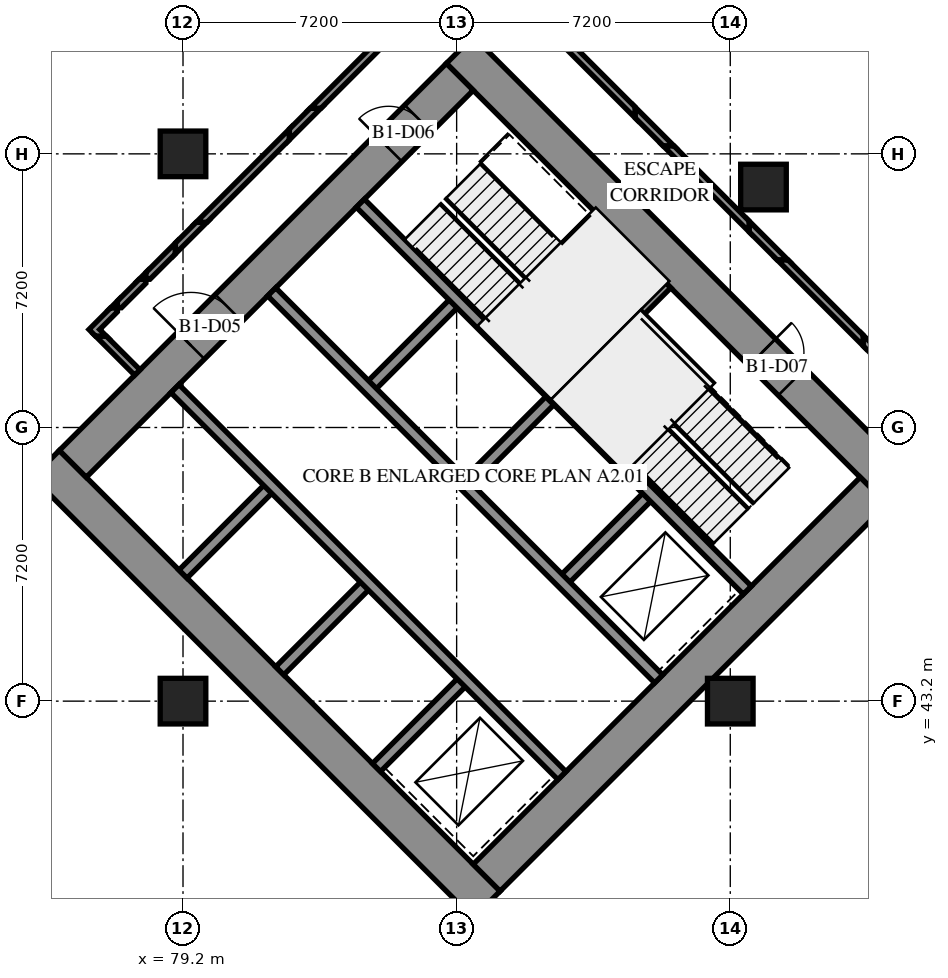
"""IFC4 building model, lengths in metres.
Left out: names, types, materials, properties, quantities, classifications, styles, units other than length and angle.
Written with IfcOpenShell. Run it as: python <this file> out.ifc"""

import sys

from ifc_helpers import new_model, si_unit, direction, frame, frame_2d, origin, origin_2d, place, context, subcontext, project, spatial, polyline, rectangle, outline, extrude, element, fill, save


model = new_model("IFC4")
c1 = context("Model", 3, precision=1e-05, world=origin(), true_north=direction((0.0, 1.0)))
c2 = subcontext(c1, "Body", "Model", "MODEL_VIEW")
j1 = project(units=[si_unit("LENGTHUNIT", "METRE"), si_unit("PLANEANGLEUNIT", "RADIAN")], contexts=[c1])
p1 = place(None, origin())
s1 = spatial("IfcSite", under=j1, at=p1, CompositionType="ELEMENT")
p2 = place(p1, origin())
s2 = spatial("IfcBuilding", under=s1, at=p2, CompositionType="ELEMENT")
p3 = place(p2, frame((0.0, 0.0, -4.5)))
s3 = spatial("IfcBuildingStorey", under=s2, at=p3, CompositionType="ELEMENT", Elevation=-4.5)
p4 = place(p3, frame((0.0, 0.0, -0.3)))
e1 = element("IfcWall", 1, at=p4, inside=s3, PredefinedType="SOLIDWALL", context=c2, shape_type="SweptSolid", body=[
    extrude(outline(polyline([(125.02, 34.665), (81.685, 78.0), (81.934, 78.6), (125.869, 34.665), (125.02, 34.665)])), origin(), (0.0, 0.0, 1.0), 4.4),
])
for number, where, z_axis, x_axis in (
    (2, (79.2, 43.2, 0.0), (0.0, 0.0, 1.0), (1.0, 0.0, 0.0)),
    (3, (79.2, 57.6, 0.0), (0.0, 0.0, 1.0), (1.0, 0.0, 0.0)),
    (4, (94.474, 56.727, 0.0), (0.0, 0.0, 1.0), (1.0, 0.0, 0.0)),
    (5, (93.6, 43.2, 0.0), (0.0, 0.0, 1.0), (1.0, 0.0, 0.0)),
):
    element("IfcColumn", number, at=place(p3, frame(where, z_axis=z_axis, x_axis=x_axis)), inside=s3, PredefinedType="COLUMN", context=c2, shape_type="SweptSolid", body=[
        extrude(rectangle(XDim=1.2, YDim=1.2, at=origin_2d()), origin(), (0.0, 0.0, 1.0), 4.1),
    ])
p5 = place(p3, frame((75.594, 49.443, -0.3), z_axis=(0.0, 0.0, 1.0), x_axis=(0.7071037324, -0.70710983, 0.0)))
e6 = element("IfcWall", 6, at=p5, inside=s3, PredefinedType="SHEAR", context=c2, shape_type="SweptSolid", body=[
    extrude(rectangle(XDim=16.4, YDim=1.0, at=frame_2d((8.2, 0.0))), origin(), (0.0, 0.0, 1.0), 3.7),
])
p6 = place(p3, frame((86.483, 60.333, -0.3), z_axis=(0.0, 0.0, 1.0), x_axis=(0.70710983, -0.7071037324, 0.0)))
e7 = element("IfcWall", 7, at=p6, inside=s3, PredefinedType="SHEAR", context=c2, shape_type="SweptSolid", body=[
    extrude(rectangle(XDim=16.4, YDim=1.0, at=frame_2d((8.2, 0.0))), origin(), (0.0, 0.0, 1.0), 3.7),
])
p7 = place(p6, frame((11.25, 0.0, 0.3)))
e8 = element("IfcOpeningElement", 8, at=p7, cuts=e7, PredefinedType="OPENING", context=c2, shape_type="SweptSolid", body=[
    extrude(rectangle(XDim=1.1, YDim=2.1, at=frame_2d((0.55, 1.05))), frame((0.0, 0.51, 0.0), z_axis=(0.0, -1.0, 0.0), x_axis=(1.0, 0.0, 0.0)), (0.0, 0.0, 1.0), 1.02),
])
p8 = place(p3, frame((76.301, 49.443, -0.3), z_axis=(0.0, 0.0, 1.0), x_axis=(0.7071067812, 0.7071067812, 0.0)))
e9 = element("IfcWall", 9, at=p8, inside=s3, PredefinedType="SHEAR", context=c2, shape_type="SweptSolid", body=[
    extrude(rectangle(XDim=14.4, YDim=1.0, at=frame_2d((7.2, 0.0))), origin(), (0.0, 0.0, 1.0), 3.7),
])
p9 = place(p8, frame((4.4, 0.0, 0.3)))
e10 = element("IfcOpeningElement", 10, at=p9, cuts=e9, PredefinedType="OPENING", context=c2, shape_type="SweptSolid", body=[
    extrude(rectangle(XDim=1.4, YDim=2.1, at=frame_2d((0.7, 1.05))), frame((0.0, 0.51, 0.0), z_axis=(0.0, -1.0, 0.0), x_axis=(1.0, 0.0, 0.0)), (0.0, 0.0, 1.0), 1.02),
])
p10 = place(p8, frame((11.75, 0.0, 0.3)))
e11 = element("IfcOpeningElement", 11, at=p10, cuts=e9, PredefinedType="OPENING", context=c2, shape_type="SweptSolid", body=[
    extrude(rectangle(XDim=1.1, YDim=2.1, at=frame_2d((0.55, 1.05))), frame((0.0, 0.51, 0.0), z_axis=(0.0, -1.0, 0.0), x_axis=(1.0, 0.0, 0.0)), (0.0, 0.0, 1.0), 1.02),
])
p11 = place(p3, frame((87.19, 38.554, -0.3), z_axis=(0.0, 0.0, 1.0), x_axis=(0.707103309, 0.7071102534, 0.0)))
e12 = element("IfcWall", 12, at=p11, inside=s3, PredefinedType="SHEAR", context=c2, shape_type="SweptSolid", body=[
    extrude(rectangle(XDim=14.4, YDim=1.0, at=frame_2d((7.2, 0.0))), origin(), (0.0, 0.0, 1.0), 3.7),
])
for number, where, z_axis, x_axis in (
    (13, (79.2, 46.544, 0.0), (0.0, 0.0, 1.0), (0.707, 0.707, 0.0)),
    (14, (84.079, 51.423, 0.0), (0.0, 0.0, 1.0), (0.707, 0.707, 0.0)),
):
    element("IfcWall", number, at=place(p3, frame(where, z_axis=z_axis, x_axis=x_axis)), inside=s3, PredefinedType="SOLIDWALL", context=c2, shape_type="SweptSolid", body=[
        extrude(rectangle(XDim=3.3, YDim=0.3, at=frame_2d((1.65, 0.0))), origin(), (0.0, 0.0, 1.0), 4.1),
    ])
p12 = place(p3, frame((81.746, 43.999, 0.0), z_axis=(0.0, 0.0, 1.0), x_axis=(0.7071067812, 0.7071067812, 0.0)))
e15 = element("IfcWall", 15, at=p12, inside=s3, PredefinedType="SOLIDWALL", context=c2, shape_type="SweptSolid", body=[
    extrude(rectangle(XDim=3.3, YDim=0.3, at=frame_2d((1.65, 0.0))), origin(), (0.0, 0.0, 1.0), 4.1),
])
p13 = place(p3, frame((86.625, 48.878, 0.0), z_axis=(0.0, 0.0, 1.0), x_axis=(0.7071067812, 0.7071067812, 0.0)))
e16 = element("IfcWall", 16, at=p13, inside=s3, PredefinedType="SOLIDWALL", context=c2, shape_type="SweptSolid", body=[
    extrude(rectangle(XDim=3.3, YDim=0.3, at=frame_2d((1.65, 0.0))), origin(), (0.0, 0.0, 1.0), 4.1),
])
p14 = place(p3, frame((84.291, 41.453, 0.0), z_axis=(0.0, 0.0, 1.0), x_axis=(0.7071067812, 0.7071067812, 0.0)))
e17 = element("IfcWall", 17, at=p14, inside=s3, PredefinedType="SOLIDWALL", context=c2, shape_type="SweptSolid", body=[
    extrude(rectangle(XDim=3.3, YDim=0.3, at=frame_2d((1.65, 0.0))), origin(), (0.0, 0.0, 1.0), 4.1),
])
p15 = place(p3, frame((89.17, 46.332, 0.0), z_axis=(0.0, 0.0, 1.0), x_axis=(0.7071067812, 0.7071067812, 0.0)))
e18 = element("IfcWall", 18, at=p15, inside=s3, PredefinedType="SOLIDWALL", context=c2, shape_type="SweptSolid", body=[
    extrude(rectangle(XDim=3.3, YDim=0.3, at=frame_2d((1.65, 0.0))), origin(), (0.0, 0.0, 1.0), 4.1),
])
p16 = place(p3, frame((78.988, 51.423, 0.0), z_axis=(0.0, 0.0, 1.0), x_axis=(0.7071067812, -0.7071067812, 0.0)))
e19 = element("IfcWall", 19, at=p16, inside=s3, PredefinedType="SOLIDWALL", context=c2, shape_type="SweptSolid", body=[
    extrude(rectangle(XDim=14.4, YDim=0.3, at=frame_2d((7.2, 0.0))), origin(), (0.0, 0.0, 1.0), 4.1),
])
p17 = place(p3, frame((81.534, 53.969, 0.0), z_axis=(0.0, 0.0, 1.0), x_axis=(0.707103309, -0.7071102534, 0.0)))
e20 = element("IfcWall", 20, at=p17, inside=s3, PredefinedType="SOLIDWALL", context=c2, shape_type="SweptSolid", body=[
    extrude(rectangle(XDim=14.4, YDim=0.3, at=frame_2d((7.2, 0.0))), origin(), (0.0, 0.0, 1.0), 4.1),
])
for number, where, z_axis, x_axis in (
    (21, (83.867, 56.302, 0.0), (0.0, 0.0, 1.0), (0.707, -0.707, 0.0)),
    (22, (88.958, 51.211, 0.0), (0.0, 0.0, 1.0), (0.707, -0.707, 0.0)),
):
    element("IfcWall", number, at=place(p3, frame(where, z_axis=z_axis, x_axis=x_axis)), inside=s3, PredefinedType="SOLIDWALL", context=c2, shape_type="SweptSolid", body=[
        extrude(rectangle(XDim=7.2, YDim=0.3, at=frame_2d((3.6, 0.0))), origin(), (0.0, 0.0, 1.0), 4.1),
    ])
p18 = place(p3, frame((88.958, 51.211, 0.0), z_axis=(0.0, 0.0, 1.0), x_axis=(0.7071067812, 0.7071067812, 0.0)))
e23 = element("IfcWall", 23, at=p18, inside=s3, PredefinedType="SOLIDWALL", context=c2, shape_type="SweptSolid", body=[
    extrude(rectangle(XDim=4.2, YDim=0.3, at=frame_2d((2.1, 0.0))), origin(), (0.0, 0.0, 1.0), 4.1),
])
p19 = place(p3, frame((82.224, 79.3, -0.3), z_axis=(0.0, 0.0, 1.0), x_axis=(0.7071059906, -0.7071075718, 0.0)))
e24 = element("IfcWall", 24, at=p19, inside=s3, PredefinedType="SOLIDWALL", context=c2, shape_type="SweptSolid", body=[
    extrude(outline(polyline([(0.041, -0.2), (63.2, -0.2), (63.282, 0.2), (-0.041, 0.2), (0.041, -0.2)])), origin(), (0.0, 0.0, 1.0), 4.65),
])
p20 = place(p3, origin())
e25 = element("IfcWall", 25, at=p20, inside=s3, PredefinedType="PARTITIONING", context=c2, shape_type="SweptSolid", body=[
    extrude(outline(polyline([(76.904, 52.8), (77.187, 52.8), (77.008, 52.979), (77.475, 53.446), (77.475, 53.55), (77.296, 53.55), (76.725, 52.979), (76.904, 52.8)])), origin(), (0.0, 0.0, 1.0), 4.1),
])
e26 = element("IfcWall", 26, at=p20, inside=s3, PredefinedType="PARTITIONING", context=c2, shape_type="SweptSolid", body=[
    extrude(outline(polyline([(77.475, 53.729), (77.296, 53.55), (77.475, 53.55), (77.475, 53.729)])), origin(), (0.0, 0.0, 1.0), 4.1),
])
e27 = element("IfcWall", 27, at=p20, inside=s3, PredefinedType="PARTITIONING", context=c2, shape_type="SweptSolid", body=[
    extrude(outline(polyline([(77.927, 51.777), (78.069, 51.918), (77.187, 52.8), (76.904, 52.8), (77.927, 51.777)])), origin(), (0.0, 0.0, 1.0), 4.1),
])
e28 = element("IfcWall", 28, at=p20, inside=s3, PredefinedType="PARTITIONING", context=c2, shape_type="SweptSolid", body=[
    extrude(outline(polyline([(78.046, 54.3), (77.475, 53.729), (77.475, 53.55), (77.579, 53.55), (78.225, 54.196), (78.225, 54.3), (78.046, 54.3)])), origin(), (0.0, 0.0, 1.0), 4.1),
])
e29 = element("IfcWall", 29, at=p20, inside=s3, PredefinedType="PARTITIONING", context=c2, shape_type="SweptSolid", body=[
    extrude(outline(polyline([(78.225, 54.479), (78.046, 54.3), (78.225, 54.3), (78.225, 54.479)])), origin(), (0.0, 0.0, 1.0), 4.1),
])
e30 = element("IfcWall", 30, at=p20, inside=s3, PredefinedType="PARTITIONING", context=c2, shape_type="SweptSolid", body=[
    extrude(outline(polyline([(79.0, 55.254), (78.225, 54.479), (78.225, 54.3), (78.329, 54.3), (79.0, 54.971), (79.0, 55.254)])), origin(), (0.0, 0.0, 1.0), 4.1),
])
e31 = element("IfcWall", 31, at=p20, inside=s3, PredefinedType="PARTITIONING", context=c2, shape_type="SweptSolid", body=[
    extrude(outline(polyline([(79.0, 54.971), (79.829, 55.8), (79.546, 55.8), (79.0, 55.254), (79.0, 54.971)])), origin(), (0.0, 0.0, 1.0), 4.1),
])
e32 = element("IfcWall", 32, at=p20, inside=s3, PredefinedType="PARTITIONING", context=c2, shape_type="SweptSolid", body=[
    extrude(outline(polyline([(79.829, 55.8), (82.0, 57.971), (82.0, 58.254), (79.546, 55.8), (79.829, 55.8)])), origin(), (0.0, 0.0, 1.0), 4.1),
])
e33 = element("IfcWall", 33, at=p20, inside=s3, PredefinedType="PARTITIONING", context=c2, shape_type="SweptSolid", body=[
    extrude(outline(polyline([(82.0, 57.971), (82.829, 58.8), (82.546, 58.8), (82.0, 58.254), (82.0, 57.971)])), origin(), (0.0, 0.0, 1.0), 4.1),
])
e34 = element("IfcWall", 34, at=p20, inside=s3, PredefinedType="PARTITIONING", context=c2, shape_type="SweptSolid", body=[
    extrude(outline(polyline([(82.829, 58.8), (85.0, 60.971), (85.0, 61.254), (82.546, 58.8), (82.829, 58.8)])), origin(), (0.0, 0.0, 1.0), 4.1),
])
e35 = element("IfcWall", 35, at=p20, inside=s3, PredefinedType="PARTITIONING", context=c2, shape_type="SweptSolid", body=[
    extrude(outline(polyline([(91.1, 58.827), (89.12, 60.807), (88.838, 60.807), (91.1, 58.544), (91.1, 58.827)])), origin(), (0.0, 0.0, 1.0), 4.1),
])
e36 = element("IfcWall", 36, at=p20, inside=s3, PredefinedType="PARTITIONING", context=c2, shape_type="SweptSolid", body=[
    extrude(outline(polyline([(92.12, 57.807), (91.1, 58.827), (91.1, 58.544), (91.838, 57.807), (92.12, 57.807)])), origin(), (0.0, 0.0, 1.0), 4.1),
])
e37 = element("IfcWall", 37, at=p20, inside=s3, PredefinedType="PARTITIONING", context=c2, shape_type="SweptSolid", body=[
    extrude(outline(polyline([(94.1, 55.827), (92.12, 57.807), (91.838, 57.807), (94.1, 55.544), (94.1, 55.827)])), origin(), (0.0, 0.0, 1.0), 4.1),
])
e38 = element("IfcWall", 38, at=p20, inside=s3, PredefinedType="PARTITIONING", context=c2, shape_type="SweptSolid", body=[
    extrude(outline(polyline([(95.12, 54.807), (94.1, 55.827), (94.1, 55.544), (94.838, 54.807), (95.12, 54.807)])), origin(), (0.0, 0.0, 1.0), 4.1),
])
e39 = element("IfcWall", 39, at=p20, inside=s3, PredefinedType="PARTITIONING", context=c2, shape_type="SweptSolid", body=[
    extrude(outline(polyline([(97.1, 52.827), (95.12, 54.807), (94.838, 54.807), (97.1, 52.544), (97.1, 52.827)])), origin(), (0.0, 0.0, 1.0), 4.1),
])
e40 = element("IfcWall", 40, at=p20, inside=s3, PredefinedType="PARTITIONING", context=c2, shape_type="SweptSolid", body=[
    extrude(outline(polyline([(98.12, 51.807), (97.1, 52.827), (97.1, 52.544), (97.838, 51.807), (98.12, 51.807)])), origin(), (0.0, 0.0, 1.0), 4.1),
])
p21 = place(p9, origin())
e41 = element("IfcDoor", 41, at=p21, inside=s3, OperationType="SINGLE_SWING_RIGHT", PredefinedType="DOOR", context=c2, shape_type="SweptSolid", body=[
    extrude(rectangle(XDim=1.4, YDim=2.1, at=frame_2d((0.7, 1.05))), frame((0.0, 0.025, 0.0), z_axis=(0.0, -1.0, 0.0), x_axis=(1.0, 0.0, 0.0)), (0.0, 0.0, 1.0), 0.05),
])
fill(e10, e41)
p22 = place(p10, origin())
e42 = element("IfcDoor", 42, at=p22, inside=s3, OperationType="SINGLE_SWING_LEFT", PredefinedType="DOOR", context=c2, shape_type="SweptSolid", body=[
    extrude(rectangle(XDim=1.1, YDim=2.1, at=frame_2d((0.55, 1.05))), frame((0.0, 0.025, 0.0), z_axis=(0.0, -1.0, 0.0), x_axis=(1.0, 0.0, 0.0)), (0.0, 0.0, 1.0), 0.05),
])
fill(e11, e42)
p23 = place(p7, origin())
e43 = element("IfcDoor", 43, at=p23, inside=s3, OperationType="SINGLE_SWING_RIGHT", PredefinedType="DOOR", context=c2, shape_type="SweptSolid", body=[
    extrude(rectangle(XDim=1.1, YDim=2.1, at=frame_2d((0.55, 1.05))), frame((0.0, 0.025, 0.0), z_axis=(0.0, -1.0, 0.0), x_axis=(1.0, 0.0, 0.0)), (0.0, 0.0, 1.0), 0.05),
])
fill(e8, e43)
save(model, sys.argv[1])
